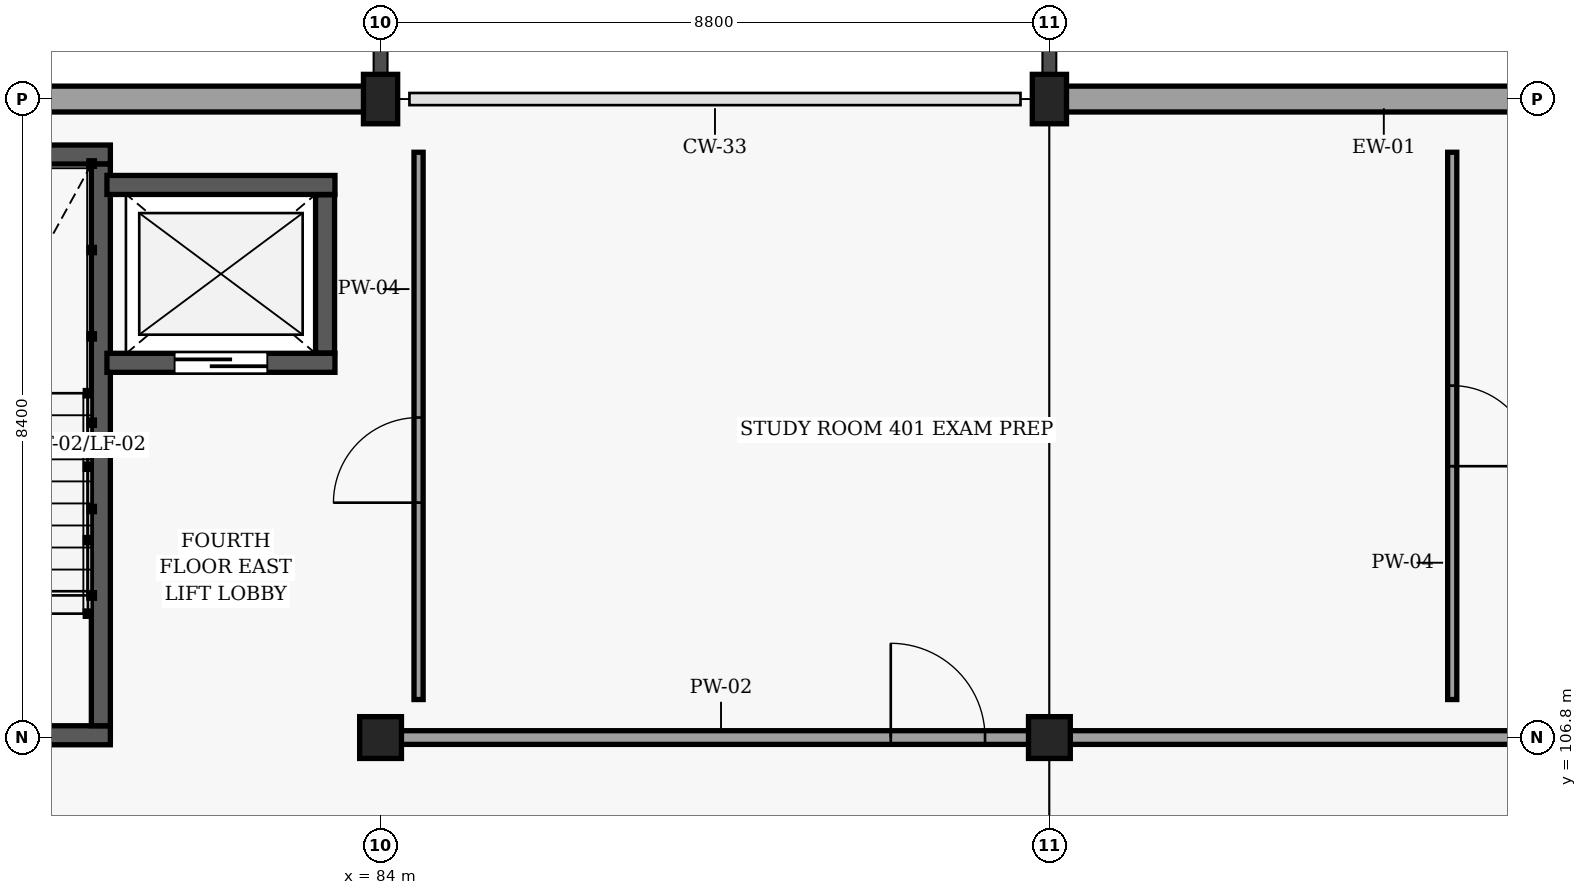
"""IFC4 building model, lengths in metres.
Left out: names, types, materials, properties, quantities, classifications, styles, units other than length and angle.
Written with IfcOpenShell. Run it as: python <this file> out.ifc"""

import sys

from ifc_helpers import new_model, si_unit, direction, frame, frame_2d, origin, origin_2d, place, context, subcontext, project, spatial, rectangle, extrude, element, fill, save


model = new_model("IFC4")
c1 = context("Model", 3, precision=1e-05, world=origin(), true_north=direction((0.0, 1.0)))
c2 = subcontext(c1, "Body", "Model", "MODEL_VIEW")
j1 = project(units=[si_unit("LENGTHUNIT", "METRE"), si_unit("PLANEANGLEUNIT", "RADIAN")], contexts=[c1])
p1 = place(None, origin())
s1 = spatial("IfcSite", under=j1, at=p1, CompositionType="ELEMENT")
p2 = place(p1, origin())
s2 = spatial("IfcBuilding", under=s1, at=p2, CompositionType="ELEMENT")
p3 = place(p2, frame((0.0, 0.0, 16.5)))
s3 = spatial("IfcBuildingStorey", under=s2, at=p3, CompositionType="ELEMENT", Elevation=16.5)
p4 = place(p3, frame((84.0, 106.8, 0.0), z_axis=(0.0, 0.0, 1.0), x_axis=(1.0, 0.0, 0.0)))
e1 = element("IfcColumn", 1, at=p4, inside=s3, PredefinedType="COLUMN", context=c2, shape_type="SweptSolid", body=[
    extrude(rectangle(XDim=0.55, YDim=0.55, at=origin_2d()), origin(), (0.0, 0.0, 1.0), 3.6),
])
p5 = place(p3, frame((84.0, 115.2, 0.0), z_axis=(0.0, 0.0, 1.0), x_axis=(1.0, 0.0, 0.0)))
e2 = element("IfcColumn", 2, at=p5, inside=s3, PredefinedType="COLUMN", context=c2, shape_type="SweptSolid", body=[
    extrude(rectangle(XDim=0.45, YDim=0.65, at=origin_2d()), origin(), (0.0, 0.0, 1.0), 3.6),
])
p6 = place(p3, frame((92.8, 106.8, 0.0), z_axis=(0.0, 0.0, 1.0), x_axis=(1.0, 0.0, 0.0)))
e3 = element("IfcColumn", 3, at=p6, inside=s3, PredefinedType="COLUMN", context=c2, shape_type="SweptSolid", body=[
    extrude(rectangle(XDim=0.55, YDim=0.55, at=origin_2d()), origin(), (0.0, 0.0, 1.0), 3.6),
])
p7 = place(p3, frame((92.8, 115.2, 0.0), z_axis=(0.0, 0.0, 1.0), x_axis=(1.0, 0.0, 0.0)))
e4 = element("IfcColumn", 4, at=p7, inside=s3, PredefinedType="COLUMN", context=c2, shape_type="SweptSolid", body=[
    extrude(rectangle(XDim=0.45, YDim=0.65, at=origin_2d()), origin(), (0.0, 0.0, 1.0), 3.6),
])
p8 = place(p3, frame((75.3, 115.2, 0.0), z_axis=(0.0, 0.0, 1.0), x_axis=(1.0, 0.0, 0.0)))
e5 = element("IfcWall", 5, at=p8, inside=s3, PredefinedType="SOLIDWALL", context=c2, shape_type="SweptSolid", body=[
    extrude(rectangle(XDim=8.6, YDim=0.34, at=frame_2d((4.3, 0.0))), origin(), (0.0, 0.0, 1.0), 2.885),
])
p9 = place(p3, frame((92.9, 115.2, 0.0), z_axis=(0.0, 0.0, 1.0), x_axis=(1.0, 0.0, 0.0)))
e6 = element("IfcWall", 6, at=p9, inside=s3, PredefinedType="SOLIDWALL", context=c2, shape_type="SweptSolid", body=[
    extrude(rectangle(XDim=8.6, YDim=0.34, at=frame_2d((4.3, 0.0))), origin(), (0.0, 0.0, 1.0), 2.885),
])
p10 = place(p3, frame((80.445, 106.83, 0.0), z_axis=(0.0, 0.0, 1.0), x_axis=(-1.0, 0.0, 0.0)))
e7 = element("IfcWall", 7, at=p10, inside=s3, PredefinedType="SHEAR", context=c2, shape_type="SweptSolid", body=[
    extrude(rectangle(XDim=3.61, YDim=0.25, at=frame_2d((1.805, 0.0))), origin(), (0.0, 0.0, 1.0), 3.38),
])
p11 = place(p10, frame((1.235, 0.0, 0.0)))
e8 = element("IfcOpeningElement", 8, at=p11, cuts=e7, PredefinedType="OPENING", context=c2, shape_type="SweptSolid", body=[
    extrude(rectangle(XDim=1.14, YDim=2.15, at=frame_2d((0.57, 1.075))), frame((0.0, 0.135, 0.0), z_axis=(0.0, -1.0, 0.0), x_axis=(1.0, 0.0, 0.0)), (0.0, 0.0, 1.0), 0.27),
])
p12 = place(p3, frame((76.835, 114.47, 0.0), z_axis=(0.0, 0.0, 1.0), x_axis=(1.0, 0.0, 0.0)))
e9 = element("IfcWall", 9, at=p12, inside=s3, PredefinedType="SHEAR", context=c2, shape_type="SweptSolid", body=[
    extrude(rectangle(XDim=3.61, YDim=0.25, at=frame_2d((1.805, 0.0))), origin(), (0.0, 0.0, 1.0), 3.38),
])
p13 = place(p3, frame((80.32, 114.345, 0.0), z_axis=(0.0, 0.0, 1.0), x_axis=(0.0, -1.0, 0.0)))
e10 = element("IfcWall", 10, at=p13, inside=s3, PredefinedType="SHEAR", context=c2, shape_type="SweptSolid", body=[
    extrude(rectangle(XDim=7.39, YDim=0.25, at=frame_2d((3.695, 0.0))), origin(), (0.0, 0.0, 1.0), 3.38),
])
p14 = place(p3, frame((80.4, 111.73, 0.0), z_axis=(0.0, 0.0, 1.0), x_axis=(1.0, 0.0, 0.0)))
e11 = element("IfcWall", 11, at=p14, inside=s3, PredefinedType="SHEAR", context=c2, shape_type="SweptSolid", body=[
    extrude(rectangle(XDim=3.0, YDim=0.25, at=frame_2d((1.5, 0.0))), origin(), (0.0, 0.0, 1.0), 3.38),
])
p15 = place(p14, frame((0.89, 0.0, 0.0)))
e12 = element("IfcOpeningElement", 12, at=p15, cuts=e11, PredefinedType="OPENING", context=c2, shape_type="SweptSolid", body=[
    extrude(rectangle(XDim=1.22, YDim=2.18, at=frame_2d((0.61, 1.09))), frame((0.0, 0.135, 0.0), z_axis=(0.0, -1.0, 0.0), x_axis=(1.0, 0.0, 0.0)), (0.0, 0.0, 1.0), 0.27),
])
p16 = place(p3, frame((83.4, 114.07, 0.0), z_axis=(0.0, 0.0, 1.0), x_axis=(-1.0, 0.0, 0.0)))
e13 = element("IfcWall", 13, at=p16, inside=s3, PredefinedType="SHEAR", context=c2, shape_type="SweptSolid", body=[
    extrude(rectangle(XDim=3.0, YDim=0.25, at=frame_2d((1.5, 0.0))), origin(), (0.0, 0.0, 1.0), 3.38),
])
p17 = place(p3, frame((83.27, 111.86, 0.0), z_axis=(0.0, 0.0, 1.0), x_axis=(0.0, 1.0, 0.0)))
e14 = element("IfcWall", 14, at=p17, inside=s3, PredefinedType="SHEAR", context=c2, shape_type="SweptSolid", body=[
    extrude(rectangle(XDim=2.08, YDim=0.25, at=frame_2d((1.04, 0.0))), origin(), (0.0, 0.0, 1.0), 3.38),
])
p18 = place(p3, frame((84.2, 106.8, 0.0), z_axis=(0.0, 0.0, 1.0), x_axis=(1.0, 0.0, 0.0)))
e15 = element("IfcWall", 15, at=p18, inside=s3, PredefinedType="PARTITIONING", context=c2, shape_type="SweptSolid", body=[
    extrude(rectangle(XDim=28.53, YDim=0.18, at=frame_2d((14.265, 0.0))), origin(), (0.0, 0.0, 1.0), 2.665),
])
p19 = place(p18, frame((6.513, 0.0, 0.0)))
e16 = element("IfcOpeningElement", 16, at=p19, cuts=e15, PredefinedType="OPENING", context=c2, shape_type="SweptSolid", body=[
    extrude(rectangle(XDim=1.24, YDim=2.2, at=frame_2d((0.62, 1.1))), frame((0.0, 0.1, 0.0), z_axis=(0.0, -1.0, 0.0), x_axis=(1.0, 0.0, 0.0)), (0.0, 0.0, 1.0), 0.2),
])
p20 = place(p18, frame((14.935, 0.0, 0.0)))
e17 = element("IfcOpeningElement", 17, at=p20, cuts=e15, PredefinedType="OPENING", context=c2, shape_type="SweptSolid", body=[
    extrude(rectangle(XDim=1.36, YDim=2.22, at=frame_2d((0.68, 1.11))), frame((0.0, 0.1, 0.0), z_axis=(0.0, -1.0, 0.0), x_axis=(1.0, 0.0, 0.0)), (0.0, 0.0, 1.0), 0.2),
])
p21 = place(p18, frame((20.557, 0.0, 0.0)))
e18 = element("IfcOpeningElement", 18, at=p21, cuts=e15, PredefinedType="OPENING", context=c2, shape_type="SweptSolid", body=[
    extrude(rectangle(XDim=1.68, YDim=2.26, at=frame_2d((0.84, 1.13))), frame((0.0, 0.1, 0.0), z_axis=(0.0, -1.0, 0.0), x_axis=(1.0, 0.0, 0.0)), (0.0, 0.0, 1.0), 0.2),
])
p22 = place(p3, frame((84.5, 107.3, 0.0), z_axis=(0.0, 0.0, 1.0), x_axis=(0.0, 1.0, 0.0)))
e19 = element("IfcWall", 19, at=p22, inside=s3, PredefinedType="PARTITIONING", context=c2, shape_type="SweptSolid", body=[
    extrude(rectangle(XDim=7.2, YDim=0.12, at=frame_2d((3.6, 0.0))), origin(), (0.0, 0.0, 1.0), 3.365),
])
p23 = place(p22, frame((2.59, 0.0, 0.0)))
e20 = element("IfcOpeningElement", 20, at=p23, cuts=e19, PredefinedType="OPENING", context=c2, shape_type="SweptSolid", body=[
    extrude(rectangle(XDim=1.12, YDim=2.16, at=frame_2d((0.56, 1.08))), frame((0.0, 0.07, 0.0), z_axis=(0.0, -1.0, 0.0), x_axis=(1.0, 0.0, 0.0)), (0.0, 0.0, 1.0), 0.14),
])
p24 = place(p3, frame((98.1, 107.3, 0.0), z_axis=(0.0, 0.0, 1.0), x_axis=(0.0, 1.0, 0.0)))
e21 = element("IfcWall", 21, at=p24, inside=s3, PredefinedType="PARTITIONING", context=c2, shape_type="SweptSolid", body=[
    extrude(rectangle(XDim=7.2, YDim=0.12, at=frame_2d((3.6, 0.0))), origin(), (0.0, 0.0, 1.0), 3.365),
])
p25 = place(p24, frame((3.07, 0.0, 0.0)))
e22 = element("IfcOpeningElement", 22, at=p25, cuts=e21, PredefinedType="OPENING", context=c2, shape_type="SweptSolid", body=[
    extrude(rectangle(XDim=1.06, YDim=2.16, at=frame_2d((0.53, 1.08))), frame((0.0, 0.07, 0.0), z_axis=(0.0, -1.0, 0.0), x_axis=(1.0, 0.0, 0.0)), (0.0, 0.0, 1.0), 0.14),
])
p26 = place(p15, origin())
e23 = element("IfcDoor", 23, at=p26, inside=s3, OperationType="SLIDING_TO_RIGHT", PredefinedType="DOOR", context=c2, shape_type="SweptSolid", body=[
    extrude(rectangle(XDim=1.22, YDim=2.18, at=frame_2d((0.61, 1.09))), frame((0.0, 0.025, 0.0), z_axis=(0.0, -1.0, 0.0), x_axis=(1.0, 0.0, 0.0)), (0.0, 0.0, 1.0), 0.05),
])
fill(e12, e23)
p27 = place(p19, origin())
e24 = element("IfcDoor", 24, at=p27, inside=s3, OperationType="SINGLE_SWING_LEFT", PredefinedType="DOOR", context=c2, shape_type="SweptSolid", body=[
    extrude(rectangle(XDim=1.24, YDim=2.2, at=frame_2d((0.62, 1.1))), frame((0.0, 0.025, 0.0), z_axis=(0.0, -1.0, 0.0), x_axis=(1.0, 0.0, 0.0)), (0.0, 0.0, 1.0), 0.05),
])
fill(e16, e24)
p28 = place(p23, origin())
e25 = element("IfcDoor", 25, at=p28, inside=s3, OperationType="SINGLE_SWING_LEFT", PredefinedType="DOOR", context=c2, shape_type="SweptSolid", body=[
    extrude(rectangle(XDim=1.12, YDim=2.16, at=frame_2d((0.56, 1.08))), frame((0.0, 0.025, 0.0), z_axis=(0.0, -1.0, 0.0), x_axis=(1.0, 0.0, 0.0)), (0.0, 0.0, 1.0), 0.05),
])
fill(e20, e25)
p29 = place(p25, origin())
e26 = element("IfcDoor", 26, at=p29, inside=s3, OperationType="SINGLE_SWING_RIGHT", PredefinedType="DOOR", context=c2, shape_type="SweptSolid", body=[
    extrude(rectangle(XDim=1.06, YDim=2.16, at=frame_2d((0.53, 1.08))), frame((0.0, 0.025, 0.0), z_axis=(0.0, -1.0, 0.0), x_axis=(1.0, 0.0, 0.0)), (0.0, 0.0, 1.0), 0.05),
])
fill(e22, e26)
save(model, sys.argv[1])
